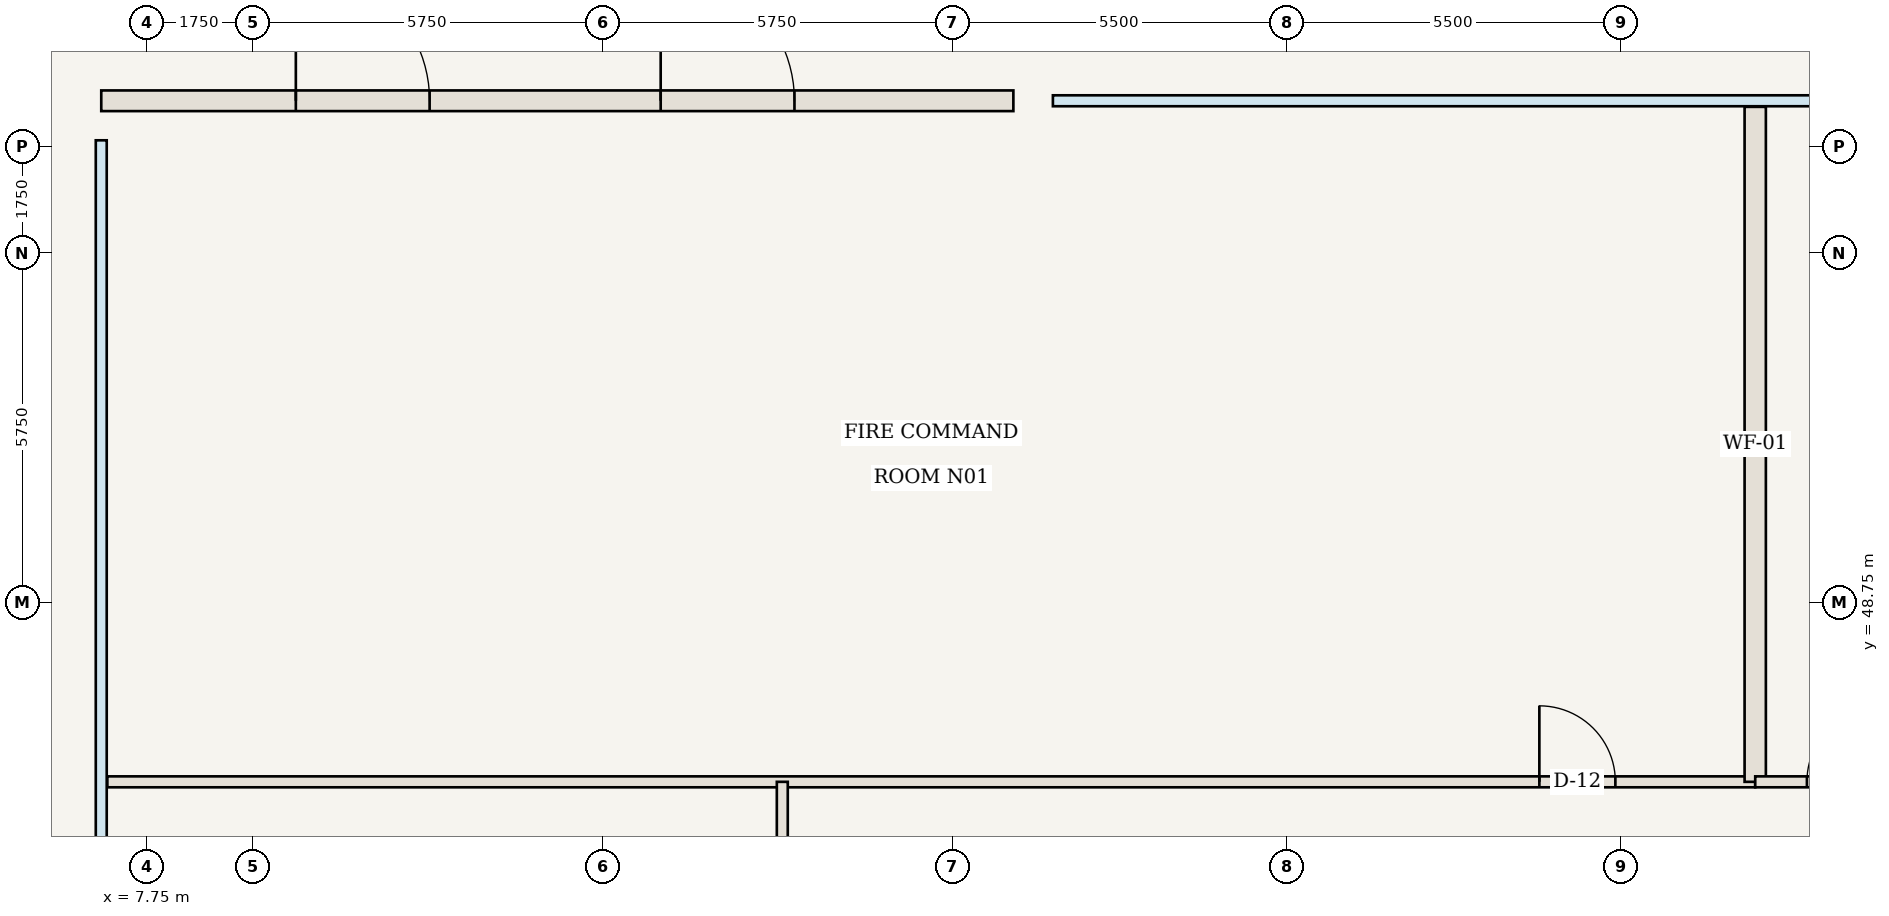
"""IFC4 building model, lengths in metres.
Left out: names, types, materials, properties, quantities, classifications, styles, units other than length and angle.
Written with IfcOpenShell. Run it as: python <this file> out.ifc"""

import sys

from ifc_helpers import new_model, si_unit, direction, frame, frame_2d, origin, place, context, subcontext, project, spatial, rectangle, extrude, element, fill, save


model = new_model("IFC4")
c1 = context("Model", 3, precision=1e-05, world=origin(), true_north=direction((0.0, 1.0)))
c2 = subcontext(c1, "Body", "Model", "MODEL_VIEW")
j1 = project(units=[si_unit("LENGTHUNIT", "METRE"), si_unit("PLANEANGLEUNIT", "RADIAN")], contexts=[c1])
p1 = place(None, origin())
s1 = spatial("IfcSite", under=j1, at=p1, CompositionType="ELEMENT")
p2 = place(p1, origin())
s2 = spatial("IfcBuilding", under=s1, at=p2, CompositionType="ELEMENT")
p3 = place(p2, origin())
s3 = spatial("IfcBuildingStorey", under=s2, at=p3, CompositionType="ELEMENT", Elevation=0.0)
p4 = place(p3, frame((7.1, 45.8, 0.0), z_axis=(0.0, 0.0, 1.0), x_axis=(1.0, 0.0, 0.0)))
e1 = element("IfcWall", 1, at=p4, inside=s3, PredefinedType="STANDARD", context=c2, shape_type="SweptSolid", body=[
    extrude(rectangle(XDim=27.1, YDim=0.18, at=frame_2d((13.55, 0.0))), origin(), (0.0, 0.0, 1.0), 6.41),
])
p5 = place(p4, frame((23.55, 0.0, 0.0)))
e2 = element("IfcOpeningElement", 2, at=p5, cuts=e1, PredefinedType="OPENING", context=c2, shape_type="SweptSolid", body=[
    extrude(rectangle(XDim=1.25, YDim=2.2, at=frame_2d((0.625, 1.1))), frame((0.0, 0.1, 0.0), z_axis=(0.0, -1.0, 0.0), x_axis=(1.0, 0.0, 0.0)), (0.0, 0.0, 1.0), 0.2),
])
p6 = place(p3, frame((34.2, 45.8, 0.0), z_axis=(0.0, 0.0, 1.0), x_axis=(0.0, 1.0, 0.0)))
e3 = element("IfcWall", 3, at=p6, inside=s3, PredefinedType="STANDARD", context=c2, shape_type="SweptSolid", body=[
    extrude(rectangle(XDim=11.1, YDim=0.35, at=frame_2d((5.55, 0.0))), origin(), (0.0, 0.0, 1.0), 6.41),
])
p7 = place(p3, frame((34.2, 45.8, 0.0), z_axis=(0.0, 0.0, 1.0), x_axis=(1.0, 0.0, 0.0)))
e4 = element("IfcWall", 4, at=p7, inside=s3, PredefinedType="STANDARD", context=c2, shape_type="SweptSolid", body=[
    extrude(rectangle(XDim=10.25, YDim=0.18, at=frame_2d((5.125, 0.0))), origin(), (0.0, 0.0, 1.0), 6.41),
])
p8 = place(p7, frame((0.85, 0.0, 0.0)))
e5 = element("IfcOpeningElement", 5, at=p8, cuts=e4, PredefinedType="OPENING", context=c2, shape_type="SweptSolid", body=[
    extrude(rectangle(XDim=1.25, YDim=2.2, at=frame_2d((0.625, 1.1))), frame((0.0, 0.1, 0.0), z_axis=(0.0, -1.0, 0.0), x_axis=(1.0, 0.0, 0.0)), (0.0, 0.0, 1.0), 0.2),
])
p9 = place(p3, frame((18.2, 34.3, 0.0), z_axis=(0.0, 0.0, 1.0), x_axis=(0.0, 1.0, 0.0)))
e6 = element("IfcWall", 6, at=p9, inside=s3, PredefinedType="STANDARD", context=c2, shape_type="SweptSolid", body=[
    extrude(rectangle(XDim=11.5, YDim=0.18, at=frame_2d((5.75, 0.0))), origin(), (0.0, 0.0, 1.0), 6.41),
])
p10 = place(p9, frame((5.25, 0.0, 0.0)))
e7 = element("IfcOpeningElement", 7, at=p10, cuts=e6, PredefinedType="OPENING", context=c2, shape_type="SweptSolid", body=[
    extrude(rectangle(XDim=0.95, YDim=2.15, at=frame_2d((0.475, 1.075))), frame((0.0, 0.1, 0.0), z_axis=(0.0, -1.0, 0.0), x_axis=(1.0, 0.0, 0.0)), (0.0, 0.0, 1.0), 0.2),
])
p11 = place(p3, frame((7.0, 57.0, 0.0), z_axis=(0.0, 0.0, 1.0), x_axis=(1.0, 0.0, 0.0)))
e8 = element("IfcWall", 8, at=p11, inside=s3, PredefinedType="USERDEFINED", context=c2, shape_type="SweptSolid", body=[
    extrude(rectangle(XDim=15.0, YDim=0.34, at=frame_2d((7.5, 0.0))), origin(), (0.0, 0.0, 1.0), 5.51),
])
p12 = place(p11, frame((3.2, 0.0, 0.0)))
e9 = element("IfcOpeningElement", 9, at=p12, cuts=e8, PredefinedType="OPENING", context=c2, shape_type="SweptSolid", body=[
    extrude(rectangle(XDim=2.2, YDim=2.4, at=frame_2d((1.1, 1.2))), frame((0.0, 0.18, 0.0), z_axis=(0.0, -1.0, 0.0), x_axis=(1.0, 0.0, 0.0)), (0.0, 0.0, 1.0), 0.36),
])
p13 = place(p11, frame((9.2, 0.0, 0.0)))
e10 = element("IfcOpeningElement", 10, at=p13, cuts=e8, PredefinedType="OPENING", context=c2, shape_type="SweptSolid", body=[
    extrude(rectangle(XDim=2.2, YDim=2.4, at=frame_2d((1.1, 1.2))), frame((0.0, 0.18, 0.0), z_axis=(0.0, -1.0, 0.0), x_axis=(1.0, 0.0, 0.0)), (0.0, 0.0, 1.0), 0.36),
])
p14 = place(p5, origin())
e11 = element("IfcDoor", 11, at=p14, inside=s3, OperationType="SINGLE_SWING_LEFT", PredefinedType="DOOR", context=c2, shape_type="SweptSolid", body=[
    extrude(rectangle(XDim=1.25, YDim=2.2, at=frame_2d((0.625, 1.1))), frame((0.0, 0.025, 0.0), z_axis=(0.0, -1.0, 0.0), x_axis=(1.0, 0.0, 0.0)), (0.0, 0.0, 1.0), 0.05),
])
fill(e2, e11)
p15 = place(p8, origin())
e12 = element("IfcDoor", 12, at=p15, inside=s3, OperationType="SINGLE_SWING_RIGHT", PredefinedType="DOOR", context=c2, shape_type="SweptSolid", body=[
    extrude(rectangle(XDim=1.25, YDim=2.2, at=frame_2d((0.625, 1.1))), frame((0.0, 0.025, 0.0), z_axis=(0.0, -1.0, 0.0), x_axis=(1.0, 0.0, 0.0)), (0.0, 0.0, 1.0), 0.05),
])
fill(e5, e12)
p16 = place(p12, origin())
e13 = element("IfcDoor", 13, at=p16, inside=s3, OperationType="DOUBLE_DOOR_SINGLE_SWING", PredefinedType="DOOR", context=c2, shape_type="SweptSolid", body=[
    extrude(rectangle(XDim=2.2, YDim=2.4, at=frame_2d((1.1, 1.2))), frame((0.0, 0.025, 0.0), z_axis=(0.0, -1.0, 0.0), x_axis=(1.0, 0.0, 0.0)), (0.0, 0.0, 1.0), 0.05),
])
fill(e9, e13)
p17 = place(p13, origin())
e14 = element("IfcDoor", 14, at=p17, inside=s3, OperationType="DOUBLE_DOOR_SINGLE_SWING", PredefinedType="DOOR", context=c2, shape_type="SweptSolid", body=[
    extrude(rectangle(XDim=2.2, YDim=2.4, at=frame_2d((1.1, 1.2))), frame((0.0, 0.025, 0.0), z_axis=(0.0, -1.0, 0.0), x_axis=(1.0, 0.0, 0.0)), (0.0, 0.0, 1.0), 0.05),
])
fill(e10, e14)
save(model, sys.argv[1])
